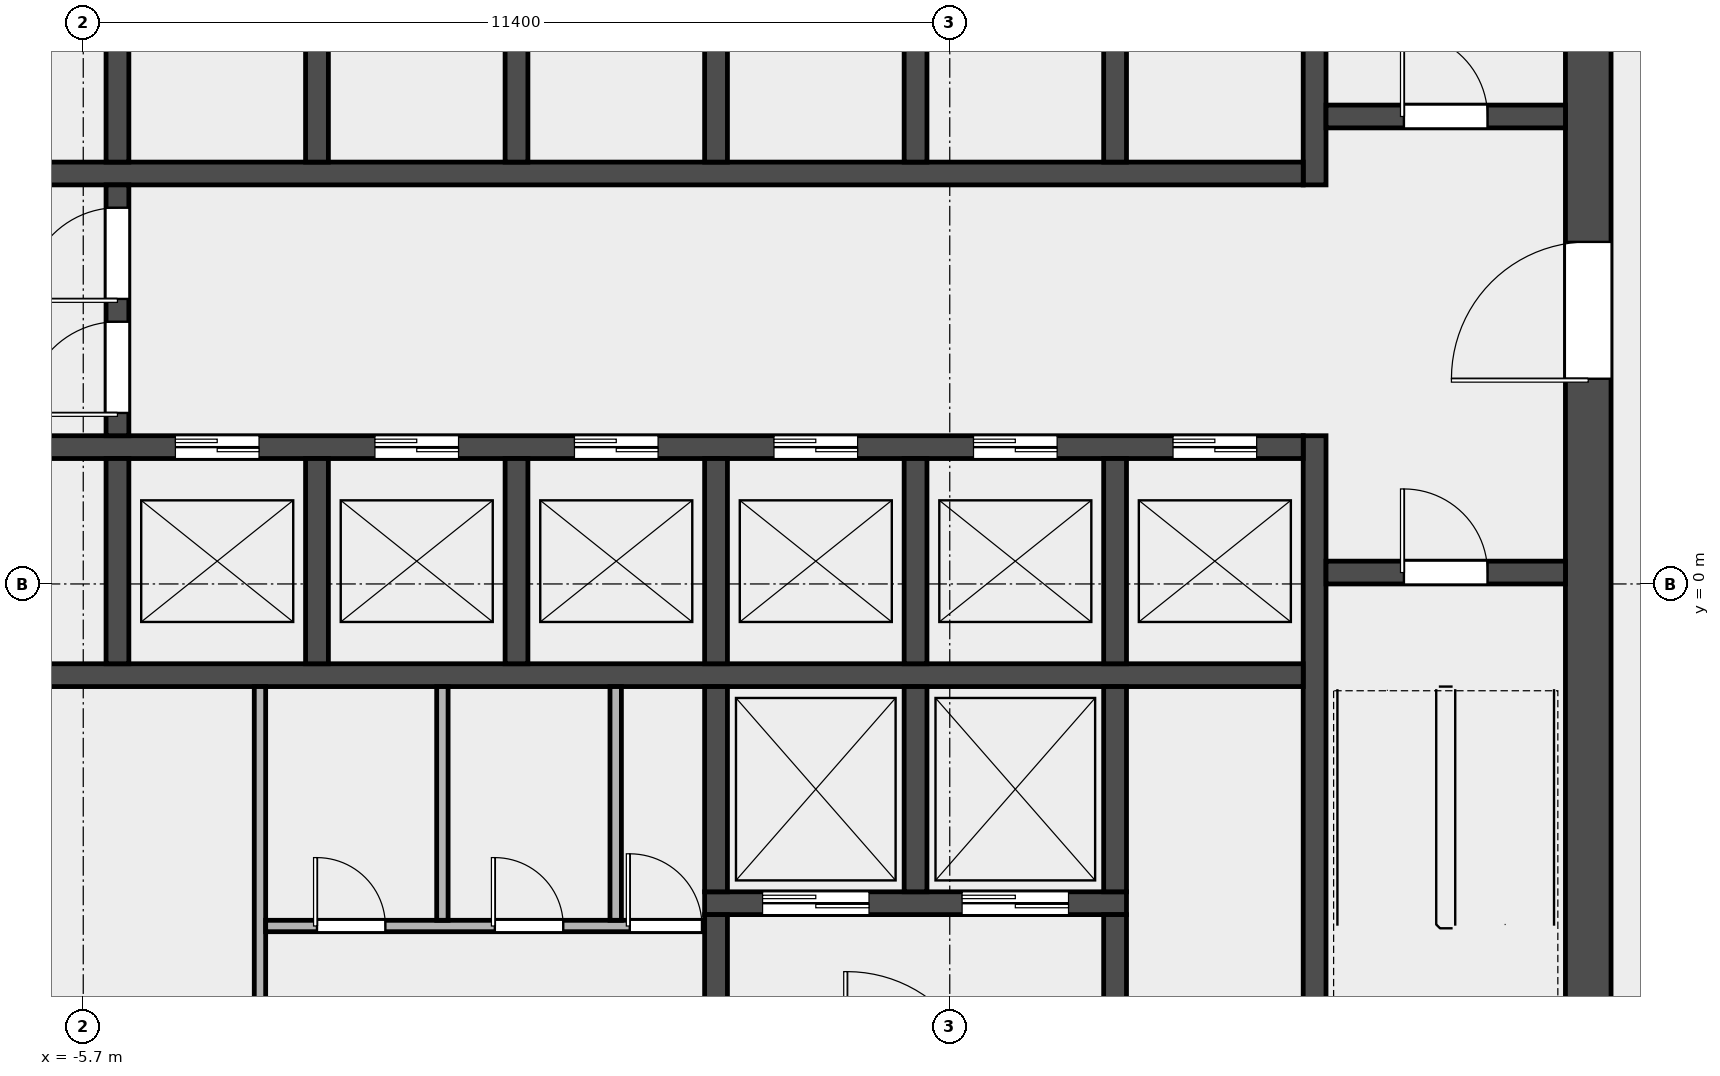
"""IFC4 building model, lengths in metres.
Left out: names, types, materials, properties, quantities, classifications, styles, units other than length and angle.
Written with IfcOpenShell. Run it as: python <this file> out.ifc"""

import sys

from ifc_helpers import new_model, si_unit, direction, frame, frame_2d, origin, place, context, subcontext, project, spatial, rectangle, extrude, element, fill, save


model = new_model("IFC4")
c1 = context("Model", 3, precision=1e-05, world=origin(), true_north=direction((0.0, 1.0)))
c2 = subcontext(c1, "Body", "Model", "MODEL_VIEW")
j1 = project(units=[si_unit("LENGTHUNIT", "METRE"), si_unit("PLANEANGLEUNIT", "RADIAN")], contexts=[c1])
p1 = place(None, origin())
s1 = spatial("IfcSite", under=j1, at=p1, CompositionType="ELEMENT")
p2 = place(p1, origin())
s2 = spatial("IfcBuilding", under=s1, at=p2, CompositionType="ELEMENT")
p3 = place(p2, frame((0.0, 0.0, 169.0)))
s3 = spatial("IfcBuildingStorey", under=s2, at=p3, CompositionType="ELEMENT", Elevation=169.0)
p4 = place(p3, frame((14.1, -6.6, 0.0), z_axis=(0.0, 0.0, 1.0), x_axis=(0.0, 1.0, 0.0)))
e1 = element("IfcWall", 1, at=p4, inside=s3, PredefinedType="SHEAR", context=c2, shape_type="SweptSolid", body=[
    extrude(rectangle(XDim=19.5, YDim=0.6, at=frame_2d((9.75, 0.0))), origin(), (0.0, 0.0, 1.0), 3.7),
])
p5 = place(p4, frame((9.3, 0.0, 0.0)))
e2 = element("IfcOpeningElement", 2, at=p5, cuts=e1, PredefinedType="OPENING", context=c2, shape_type="SweptSolid", body=[
    extrude(rectangle(XDim=1.8, YDim=2.1, at=frame_2d((0.9, 1.05))), frame((0.0, 0.312, 0.0), z_axis=(0.0, -1.0, 0.0), x_axis=(1.0, 0.0, 0.0)), (0.0, 0.0, 1.0), 0.624),
])
p6 = place(p3, frame((10.5, -6.6, 0.0), z_axis=(0.0, 0.0, 1.0), x_axis=(0.0, 1.0, 0.0)))
e3 = element("IfcWall", 3, at=p6, inside=s3, PredefinedType="SHEAR", context=c2, shape_type="SweptSolid", body=[
    extrude(rectangle(XDim=8.55, YDim=0.3, at=frame_2d((4.275, 0.0))), origin(), (0.0, 0.0, 1.0), 3.7),
])
p7 = place(p3, frame((10.5, 5.25, 0.0), z_axis=(0.0, 0.0, 1.0), x_axis=(0.0, 1.0, 0.0)))
e4 = element("IfcWall", 4, at=p7, inside=s3, PredefinedType="SHEAR", context=c2, shape_type="SweptSolid", body=[
    extrude(rectangle(XDim=7.65, YDim=0.3, at=frame_2d((3.825, 0.0))), origin(), (0.0, 0.0, 1.0), 3.7),
])
p8 = place(p3, frame((10.65, 0.15, 0.0), z_axis=(0.0, 0.0, 1.0), x_axis=(1.0, 0.0, 0.0)))
e5 = element("IfcWall", 5, at=p8, inside=s3, PredefinedType="SOLIDWALL", context=c2, shape_type="SweptSolid", body=[
    extrude(rectangle(XDim=3.15, YDim=0.3, at=frame_2d((1.575, 0.0))), origin(), (0.0, 0.0, 1.0), 3.7),
])
p9 = place(p8, frame((1.025, 0.0, 0.0)))
e6 = element("IfcOpeningElement", 6, at=p9, cuts=e5, PredefinedType="OPENING", context=c2, shape_type="SweptSolid", body=[
    extrude(rectangle(XDim=1.1, YDim=2.1, at=frame_2d((0.55, 1.05))), frame((0.0, 0.162, 0.0), z_axis=(0.0, -1.0, 0.0), x_axis=(1.0, 0.0, 0.0)), (0.0, 0.0, 1.0), 0.324),
])
p10 = place(p3, frame((10.65, 6.15, 0.0), z_axis=(0.0, 0.0, 1.0), x_axis=(1.0, 0.0, 0.0)))
e7 = element("IfcWall", 7, at=p10, inside=s3, PredefinedType="SOLIDWALL", context=c2, shape_type="SweptSolid", body=[
    extrude(rectangle(XDim=3.15, YDim=0.3, at=frame_2d((1.575, 0.0))), origin(), (0.0, 0.0, 1.0), 3.7),
])
p11 = place(p10, frame((1.025, 0.0, 0.0)))
e8 = element("IfcOpeningElement", 8, at=p11, cuts=e7, PredefinedType="OPENING", context=c2, shape_type="SweptSolid", body=[
    extrude(rectangle(XDim=1.1, YDim=2.1, at=frame_2d((0.55, 1.05))), frame((0.0, 0.162, 0.0), z_axis=(0.0, -1.0, 0.0), x_axis=(1.0, 0.0, 0.0)), (0.0, 0.0, 1.0), 0.324),
])
p12 = place(p3, frame((-10.35, -1.2, 0.0), z_axis=(0.0, 0.0, 1.0), x_axis=(1.0, 0.0, 0.0)))
e9 = element("IfcWall", 9, at=p12, inside=s3, PredefinedType="SOLIDWALL", context=c2, shape_type="SweptSolid", body=[
    extrude(rectangle(XDim=20.7, YDim=0.3, at=frame_2d((10.35, 0.0))), origin(), (0.0, 0.0, 1.0), 3.7),
])
p13 = place(p3, frame((-10.35, 1.8, 0.0), z_axis=(0.0, 0.0, 1.0), x_axis=(1.0, 0.0, 0.0)))
e10 = element("IfcWall", 10, at=p13, inside=s3, PredefinedType="SOLIDWALL", context=c2, shape_type="SweptSolid", body=[
    extrude(rectangle(XDim=20.7, YDim=0.3, at=frame_2d((10.35, 0.0))), origin(), (0.0, 0.0, 1.0), 3.7),
])
p14 = place(p13, frame((0.512, 0.0, 0.0)))
e11 = element("IfcOpeningElement", 11, at=p14, cuts=e10, PredefinedType="OPENING", context=c2, shape_type="SweptSolid", body=[
    extrude(rectangle(XDim=1.3, YDim=2.1, at=frame_2d((0.65, 1.05))), frame((0.0, 0.162, 0.0), z_axis=(0.0, -1.0, 0.0), x_axis=(1.0, 0.0, 0.0)), (0.0, 0.0, 1.0), 0.324),
])
p15 = place(p13, frame((5.863, 0.0, 0.0)))
e12 = element("IfcOpeningElement", 12, at=p15, cuts=e10, PredefinedType="OPENING", context=c2, shape_type="SweptSolid", body=[
    extrude(rectangle(XDim=1.1, YDim=2.1, at=frame_2d((0.55, 1.05))), frame((0.0, 0.162, 0.0), z_axis=(0.0, -1.0, 0.0), x_axis=(1.0, 0.0, 0.0)), (0.0, 0.0, 1.0), 0.324),
])
p16 = place(p13, frame((8.488, 0.0, 0.0)))
e13 = element("IfcOpeningElement", 13, at=p16, cuts=e10, PredefinedType="OPENING", context=c2, shape_type="SweptSolid", body=[
    extrude(rectangle(XDim=1.1, YDim=2.1, at=frame_2d((0.55, 1.05))), frame((0.0, 0.162, 0.0), z_axis=(0.0, -1.0, 0.0), x_axis=(1.0, 0.0, 0.0)), (0.0, 0.0, 1.0), 0.324),
])
p17 = place(p13, frame((11.113, 0.0, 0.0)))
e14 = element("IfcOpeningElement", 14, at=p17, cuts=e10, PredefinedType="OPENING", context=c2, shape_type="SweptSolid", body=[
    extrude(rectangle(XDim=1.1, YDim=2.1, at=frame_2d((0.55, 1.05))), frame((0.0, 0.162, 0.0), z_axis=(0.0, -1.0, 0.0), x_axis=(1.0, 0.0, 0.0)), (0.0, 0.0, 1.0), 0.324),
])
p18 = place(p13, frame((13.738, 0.0, 0.0)))
e15 = element("IfcOpeningElement", 15, at=p18, cuts=e10, PredefinedType="OPENING", context=c2, shape_type="SweptSolid", body=[
    extrude(rectangle(XDim=1.1, YDim=2.1, at=frame_2d((0.55, 1.05))), frame((0.0, 0.162, 0.0), z_axis=(0.0, -1.0, 0.0), x_axis=(1.0, 0.0, 0.0)), (0.0, 0.0, 1.0), 0.324),
])
p19 = place(p13, frame((16.363, 0.0, 0.0)))
e16 = element("IfcOpeningElement", 16, at=p19, cuts=e10, PredefinedType="OPENING", context=c2, shape_type="SweptSolid", body=[
    extrude(rectangle(XDim=1.1, YDim=2.1, at=frame_2d((0.55, 1.05))), frame((0.0, 0.162, 0.0), z_axis=(0.0, -1.0, 0.0), x_axis=(1.0, 0.0, 0.0)), (0.0, 0.0, 1.0), 0.324),
])
p20 = place(p13, frame((18.988, 0.0, 0.0)))
e17 = element("IfcOpeningElement", 17, at=p20, cuts=e10, PredefinedType="OPENING", context=c2, shape_type="SweptSolid", body=[
    extrude(rectangle(XDim=1.1, YDim=2.1, at=frame_2d((0.55, 1.05))), frame((0.0, 0.162, 0.0), z_axis=(0.0, -1.0, 0.0), x_axis=(1.0, 0.0, 0.0)), (0.0, 0.0, 1.0), 0.324),
])
p21 = place(p3, frame((-10.35, 5.4, 0.0), z_axis=(0.0, 0.0, 1.0), x_axis=(1.0, 0.0, 0.0)))
e18 = element("IfcWall", 18, at=p21, inside=s3, PredefinedType="SOLIDWALL", context=c2, shape_type="SweptSolid", body=[
    extrude(rectangle(XDim=20.7, YDim=0.3, at=frame_2d((10.35, 0.0))), origin(), (0.0, 0.0, 1.0), 3.7),
])
p22 = place(p21, frame((0.512, 0.0, 0.0)))
e19 = element("IfcOpeningElement", 19, at=p22, cuts=e18, PredefinedType="OPENING", context=c2, shape_type="SweptSolid", body=[
    extrude(rectangle(XDim=1.3, YDim=2.1, at=frame_2d((0.65, 1.05))), frame((0.0, 0.162, 0.0), z_axis=(0.0, -1.0, 0.0), x_axis=(1.0, 0.0, 0.0)), (0.0, 0.0, 1.0), 0.324),
])
for number, where, z_axis, x_axis in (
    (20, (-5.25, -1.05, 0.0), (0.0, 0.0, 1.0), (0.0, 1.0, 0.0)),
    (21, (-2.625, -1.05, 0.0), (0.0, 0.0, 1.0), (0.0, 1.0, 0.0)),
    (22, (0.0, -1.05, 0.0), (0.0, 0.0, 1.0), (0.0, 1.0, 0.0)),
    (23, (2.625, -1.05, 0.0), (0.0, 0.0, 1.0), (0.0, 1.0, 0.0)),
    (24, (5.25, -1.05, 0.0), (0.0, 0.0, 1.0), (0.0, 1.0, 0.0)),
    (25, (7.875, -1.05, 0.0), (0.0, 0.0, 1.0), (0.0, 1.0, 0.0)),
    (26, (-5.25, 5.55, 0.0), (0.0, 0.0, 1.0), (0.0, 1.0, 0.0)),
    (27, (-2.625, 5.55, 0.0), (0.0, 0.0, 1.0), (0.0, 1.0, 0.0)),
    (28, (0.0, 5.55, 0.0), (0.0, 0.0, 1.0), (0.0, 1.0, 0.0)),
    (29, (2.625, 5.55, 0.0), (0.0, 0.0, 1.0), (0.0, 1.0, 0.0)),
    (30, (5.25, 5.55, 0.0), (0.0, 0.0, 1.0), (0.0, 1.0, 0.0)),
    (31, (7.875, 5.55, 0.0), (0.0, 0.0, 1.0), (0.0, 1.0, 0.0)),
):
    element("IfcWall", number, at=place(p3, frame(where, z_axis=z_axis, x_axis=x_axis)), inside=s3, PredefinedType="SOLIDWALL", context=c2, shape_type="SweptSolid", body=[
        extrude(rectangle(XDim=2.7, YDim=0.3, at=frame_2d((1.35, 0.0))), origin(), (0.0, 0.0, 1.0), 3.7),
    ])
p23 = place(p3, frame((-5.25, 1.95, 0.0), z_axis=(0.0, 0.0, 1.0), x_axis=(0.0, 1.0, 0.0)))
e32 = element("IfcWall", 32, at=p23, inside=s3, PredefinedType="SOLIDWALL", context=c2, shape_type="SweptSolid", body=[
    extrude(rectangle(XDim=3.3, YDim=0.3, at=frame_2d((1.65, 0.0))), origin(), (0.0, 0.0, 1.0), 3.7),
])
p24 = place(p23, frame((0.3, 0.0, 0.0)))
e33 = element("IfcOpeningElement", 33, at=p24, cuts=e32, PredefinedType="OPENING", context=c2, shape_type="SweptSolid", body=[
    extrude(rectangle(XDim=1.2, YDim=2.1, at=frame_2d((0.6, 1.05))), frame((0.0, 0.162, 0.0), z_axis=(0.0, -1.0, 0.0), x_axis=(1.0, 0.0, 0.0)), (0.0, 0.0, 1.0), 0.324),
])
p25 = place(p23, frame((1.8, 0.0, 0.0)))
e34 = element("IfcOpeningElement", 34, at=p25, cuts=e32, PredefinedType="OPENING", context=c2, shape_type="SweptSolid", body=[
    extrude(rectangle(XDim=1.2, YDim=2.1, at=frame_2d((0.6, 1.05))), frame((0.0, 0.162, 0.0), z_axis=(0.0, -1.0, 0.0), x_axis=(1.0, 0.0, 0.0)), (0.0, 0.0, 1.0), 0.324),
])
p26 = place(p3, frame((2.475, -4.2, 0.0), z_axis=(0.0, 0.0, 1.0), x_axis=(1.0, 0.0, 0.0)))
e35 = element("IfcWall", 35, at=p26, inside=s3, PredefinedType="SOLIDWALL", context=c2, shape_type="SweptSolid", body=[
    extrude(rectangle(XDim=5.55, YDim=0.3, at=frame_2d((2.775, 0.0))), origin(), (0.0, 0.0, 1.0), 3.7),
])
p27 = place(p26, frame((0.762, 0.0, 0.0)))
e36 = element("IfcOpeningElement", 36, at=p27, cuts=e35, PredefinedType="OPENING", context=c2, shape_type="SweptSolid", body=[
    extrude(rectangle(XDim=1.4, YDim=2.1, at=frame_2d((0.7, 1.05))), frame((0.0, 0.162, 0.0), z_axis=(0.0, -1.0, 0.0), x_axis=(1.0, 0.0, 0.0)), (0.0, 0.0, 1.0), 0.324),
])
p28 = place(p26, frame((3.387, 0.0, 0.0)))
e37 = element("IfcOpeningElement", 37, at=p28, cuts=e35, PredefinedType="OPENING", context=c2, shape_type="SweptSolid", body=[
    extrude(rectangle(XDim=1.4, YDim=2.1, at=frame_2d((0.7, 1.05))), frame((0.0, 0.162, 0.0), z_axis=(0.0, -1.0, 0.0), x_axis=(1.0, 0.0, 0.0)), (0.0, 0.0, 1.0), 0.324),
])
p29 = place(p3, frame((2.625, -4.05, 0.0), z_axis=(0.0, 0.0, 1.0), x_axis=(0.0, 1.0, 0.0)))
e38 = element("IfcWall", 38, at=p29, inside=s3, PredefinedType="SOLIDWALL", context=c2, shape_type="SweptSolid", body=[
    extrude(rectangle(XDim=2.7, YDim=0.3, at=frame_2d((1.35, 0.0))), origin(), (0.0, 0.0, 1.0), 3.7),
])
p30 = place(p3, frame((2.625, -6.6, 0.0), z_axis=(0.0, 0.0, 1.0), x_axis=(0.0, 1.0, 0.0)))
e39 = element("IfcWall", 39, at=p30, inside=s3, PredefinedType="SOLIDWALL", context=c2, shape_type="SweptSolid", body=[
    extrude(rectangle(XDim=2.25, YDim=0.3, at=frame_2d((1.125, 0.0))), origin(), (0.0, 0.0, 1.0), 3.7),
])
for number, where, z_axis, x_axis in (
    (40, (5.25, -4.05, 0.0), (0.0, 0.0, 1.0), (0.0, 1.0, 0.0)),
    (41, (7.875, -4.05, 0.0), (0.0, 0.0, 1.0), (0.0, 1.0, 0.0)),
):
    element("IfcWall", number, at=place(p3, frame(where, z_axis=z_axis, x_axis=x_axis)), inside=s3, PredefinedType="SOLIDWALL", context=c2, shape_type="SweptSolid", body=[
        extrude(rectangle(XDim=2.7, YDim=0.3, at=frame_2d((1.35, 0.0))), origin(), (0.0, 0.0, 1.0), 3.7),
    ])
p31 = place(p3, frame((7.875, -6.6, 0.0), z_axis=(0.0, 0.0, 1.0), x_axis=(0.0, 1.0, 0.0)))
e42 = element("IfcWall", 42, at=p31, inside=s3, PredefinedType="SOLIDWALL", context=c2, shape_type="SweptSolid", body=[
    extrude(rectangle(XDim=2.25, YDim=0.3, at=frame_2d((1.125, 0.0))), origin(), (0.0, 0.0, 1.0), 3.7),
])
p32 = place(p3, frame((-3.375, -6.6, 0.0), z_axis=(0.0, 0.0, 1.0), x_axis=(0.0, 1.0, 0.0)))
e43 = element("IfcWall", 43, at=p32, inside=s3, PredefinedType="PARTITIONING", context=c2, shape_type="SweptSolid", body=[
    extrude(rectangle(XDim=5.25, YDim=0.15, at=frame_2d((2.625, 0.0))), origin(), (0.0, 0.0, 1.0), 3.7),
])
p33 = place(p3, frame((-3.3, -4.5, 0.0), z_axis=(0.0, 0.0, 1.0), x_axis=(1.0, 0.0, 0.0)))
e44 = element("IfcWall", 44, at=p33, inside=s3, PredefinedType="PARTITIONING", context=c2, shape_type="SweptSolid", body=[
    extrude(rectangle(XDim=5.775, YDim=0.15, at=frame_2d((2.888, 0.0))), origin(), (0.0, 0.0, 1.0), 3.7),
])
p34 = place(p33, frame((0.675, 0.0, 0.0)))
e45 = element("IfcOpeningElement", 45, at=p34, cuts=e44, PredefinedType="OPENING", context=c2, shape_type="SweptSolid", body=[
    extrude(rectangle(XDim=0.9, YDim=2.1, at=frame_2d((0.45, 1.05))), frame((0.0, 0.087, 0.0), z_axis=(0.0, -1.0, 0.0), x_axis=(1.0, 0.0, 0.0)), (0.0, 0.0, 1.0), 0.174),
])
p35 = place(p33, frame((3.015, 0.0, 0.0)))
e46 = element("IfcOpeningElement", 46, at=p35, cuts=e44, PredefinedType="OPENING", context=c2, shape_type="SweptSolid", body=[
    extrude(rectangle(XDim=0.9, YDim=2.1, at=frame_2d((0.45, 1.05))), frame((0.0, 0.087, 0.0), z_axis=(0.0, -1.0, 0.0), x_axis=(1.0, 0.0, 0.0)), (0.0, 0.0, 1.0), 0.174),
])
p36 = place(p33, frame((4.79, 0.0, 0.0)))
e47 = element("IfcOpeningElement", 47, at=p36, cuts=e44, PredefinedType="OPENING", context=c2, shape_type="SweptSolid", body=[
    extrude(rectangle(XDim=0.95, YDim=2.1, at=frame_2d((0.475, 1.05))), frame((0.0, 0.087, 0.0), z_axis=(0.0, -1.0, 0.0), x_axis=(1.0, 0.0, 0.0)), (0.0, 0.0, 1.0), 0.174),
])
for number, where, z_axis, x_axis in (
    (48, (-0.975, -4.425, 0.0), (0.0, 0.0, 1.0), (0.0, 1.0, 0.0)),
    (49, (1.305, -4.425, 0.0), (0.0, 0.0, 1.0), (0.0, 1.0, 0.0)),
):
    element("IfcWall", number, at=place(p3, frame(where, z_axis=z_axis, x_axis=x_axis)), inside=s3, PredefinedType="PARTITIONING", context=c2, shape_type="SweptSolid", body=[
        extrude(rectangle(XDim=3.075, YDim=0.15, at=frame_2d((1.538, 0.0))), origin(), (0.0, 0.0, 1.0), 3.7),
    ])
p37 = place(p9, origin())
e50 = element("IfcDoor", 50, at=p37, inside=s3, OperationType="SINGLE_SWING_RIGHT", PredefinedType="DOOR", context=c2, shape_type="SweptSolid", body=[
    extrude(rectangle(XDim=1.1, YDim=2.1, at=frame_2d((0.55, 1.05))), frame((0.0, 0.025, 0.0), z_axis=(0.0, -1.0, 0.0), x_axis=(1.0, 0.0, 0.0)), (0.0, 0.0, 1.0), 0.05),
])
fill(e6, e50)
p38 = place(p11, origin())
e51 = element("IfcDoor", 51, at=p38, inside=s3, OperationType="SINGLE_SWING_RIGHT", PredefinedType="DOOR", context=c2, shape_type="SweptSolid", body=[
    extrude(rectangle(XDim=1.1, YDim=2.1, at=frame_2d((0.55, 1.05))), frame((0.0, 0.025, 0.0), z_axis=(0.0, -1.0, 0.0), x_axis=(1.0, 0.0, 0.0)), (0.0, 0.0, 1.0), 0.05),
])
fill(e8, e51)
p39 = place(p5, origin())
e52 = element("IfcDoor", 52, at=p39, inside=s3, OperationType="DOUBLE_DOOR_SINGLE_SWING", PredefinedType="DOOR", context=c2, shape_type="SweptSolid", body=[
    extrude(rectangle(XDim=1.8, YDim=2.1, at=frame_2d((0.9, 1.05))), frame((0.0, 0.025, 0.0), z_axis=(0.0, -1.0, 0.0), x_axis=(1.0, 0.0, 0.0)), (0.0, 0.0, 1.0), 0.05),
])
fill(e2, e52)
p40 = place(p24, origin())
e53 = element("IfcDoor", 53, at=p40, inside=s3, OperationType="SINGLE_SWING_LEFT", PredefinedType="DOOR", context=c2, shape_type="SweptSolid", body=[
    extrude(rectangle(XDim=1.2, YDim=2.1, at=frame_2d((0.6, 1.05))), frame((0.0, 0.025, 0.0), z_axis=(0.0, -1.0, 0.0), x_axis=(1.0, 0.0, 0.0)), (0.0, 0.0, 1.0), 0.05),
])
fill(e33, e53)
p41 = place(p25, origin())
e54 = element("IfcDoor", 54, at=p41, inside=s3, OperationType="SINGLE_SWING_RIGHT", PredefinedType="DOOR", context=c2, shape_type="SweptSolid", body=[
    extrude(rectangle(XDim=1.2, YDim=2.1, at=frame_2d((0.6, 1.05))), frame((0.0, 0.025, 0.0), z_axis=(0.0, -1.0, 0.0), x_axis=(1.0, 0.0, 0.0)), (0.0, 0.0, 1.0), 0.05),
])
fill(e34, e54)
p42 = place(p15, origin())
e55 = element("IfcDoor", 55, at=p42, inside=s3, OperationType="DOUBLE_DOOR_SLIDING", PredefinedType="DOOR", context=c2, shape_type="SweptSolid", body=[
    extrude(rectangle(XDim=1.1, YDim=2.1, at=frame_2d((0.55, 1.05))), frame((0.0, 0.025, 0.0), z_axis=(0.0, -1.0, 0.0), x_axis=(1.0, 0.0, 0.0)), (0.0, 0.0, 1.0), 0.05),
])
fill(e12, e55)
p43 = place(p16, origin())
e56 = element("IfcDoor", 56, at=p43, inside=s3, OperationType="DOUBLE_DOOR_SLIDING", PredefinedType="DOOR", context=c2, shape_type="SweptSolid", body=[
    extrude(rectangle(XDim=1.1, YDim=2.1, at=frame_2d((0.55, 1.05))), frame((0.0, 0.025, 0.0), z_axis=(0.0, -1.0, 0.0), x_axis=(1.0, 0.0, 0.0)), (0.0, 0.0, 1.0), 0.05),
])
fill(e13, e56)
p44 = place(p17, origin())
e57 = element("IfcDoor", 57, at=p44, inside=s3, OperationType="DOUBLE_DOOR_SLIDING", PredefinedType="DOOR", context=c2, shape_type="SweptSolid", body=[
    extrude(rectangle(XDim=1.1, YDim=2.1, at=frame_2d((0.55, 1.05))), frame((0.0, 0.025, 0.0), z_axis=(0.0, -1.0, 0.0), x_axis=(1.0, 0.0, 0.0)), (0.0, 0.0, 1.0), 0.05),
])
fill(e14, e57)
p45 = place(p18, origin())
e58 = element("IfcDoor", 58, at=p45, inside=s3, OperationType="DOUBLE_DOOR_SLIDING", PredefinedType="DOOR", context=c2, shape_type="SweptSolid", body=[
    extrude(rectangle(XDim=1.1, YDim=2.1, at=frame_2d((0.55, 1.05))), frame((0.0, 0.025, 0.0), z_axis=(0.0, -1.0, 0.0), x_axis=(1.0, 0.0, 0.0)), (0.0, 0.0, 1.0), 0.05),
])
fill(e15, e58)
p46 = place(p19, origin())
e59 = element("IfcDoor", 59, at=p46, inside=s3, OperationType="DOUBLE_DOOR_SLIDING", PredefinedType="DOOR", context=c2, shape_type="SweptSolid", body=[
    extrude(rectangle(XDim=1.1, YDim=2.1, at=frame_2d((0.55, 1.05))), frame((0.0, 0.025, 0.0), z_axis=(0.0, -1.0, 0.0), x_axis=(1.0, 0.0, 0.0)), (0.0, 0.0, 1.0), 0.05),
])
fill(e16, e59)
p47 = place(p20, origin())
e60 = element("IfcDoor", 60, at=p47, inside=s3, OperationType="DOUBLE_DOOR_SLIDING", PredefinedType="DOOR", context=c2, shape_type="SweptSolid", body=[
    extrude(rectangle(XDim=1.1, YDim=2.1, at=frame_2d((0.55, 1.05))), frame((0.0, 0.025, 0.0), z_axis=(0.0, -1.0, 0.0), x_axis=(1.0, 0.0, 0.0)), (0.0, 0.0, 1.0), 0.05),
])
fill(e17, e60)
p48 = place(p27, origin())
e61 = element("IfcDoor", 61, at=p48, inside=s3, OperationType="DOUBLE_DOOR_SLIDING", PredefinedType="DOOR", context=c2, shape_type="SweptSolid", body=[
    extrude(rectangle(XDim=1.4, YDim=2.1, at=frame_2d((0.7, 1.05))), frame((0.0, 0.025, 0.0), z_axis=(0.0, -1.0, 0.0), x_axis=(1.0, 0.0, 0.0)), (0.0, 0.0, 1.0), 0.05),
])
fill(e36, e61)
p49 = place(p28, origin())
e62 = element("IfcDoor", 62, at=p49, inside=s3, OperationType="DOUBLE_DOOR_SLIDING", PredefinedType="DOOR", context=c2, shape_type="SweptSolid", body=[
    extrude(rectangle(XDim=1.4, YDim=2.1, at=frame_2d((0.7, 1.05))), frame((0.0, 0.025, 0.0), z_axis=(0.0, -1.0, 0.0), x_axis=(1.0, 0.0, 0.0)), (0.0, 0.0, 1.0), 0.05),
])
fill(e37, e62)
p50 = place(p34, origin())
e63 = element("IfcDoor", 63, at=p50, inside=s3, OperationType="SINGLE_SWING_LEFT", PredefinedType="DOOR", context=c2, shape_type="SweptSolid", body=[
    extrude(rectangle(XDim=0.9, YDim=2.1, at=frame_2d((0.45, 1.05))), frame((0.0, 0.025, 0.0), z_axis=(0.0, -1.0, 0.0), x_axis=(1.0, 0.0, 0.0)), (0.0, 0.0, 1.0), 0.05),
])
fill(e45, e63)
p51 = place(p35, origin())
e64 = element("IfcDoor", 64, at=p51, inside=s3, OperationType="SINGLE_SWING_LEFT", PredefinedType="DOOR", context=c2, shape_type="SweptSolid", body=[
    extrude(rectangle(XDim=0.9, YDim=2.1, at=frame_2d((0.45, 1.05))), frame((0.0, 0.025, 0.0), z_axis=(0.0, -1.0, 0.0), x_axis=(1.0, 0.0, 0.0)), (0.0, 0.0, 1.0), 0.05),
])
fill(e46, e64)
p52 = place(p36, origin())
e65 = element("IfcDoor", 65, at=p52, inside=s3, OperationType="SINGLE_SWING_LEFT", PredefinedType="DOOR", context=c2, shape_type="SweptSolid", body=[
    extrude(rectangle(XDim=0.95, YDim=2.1, at=frame_2d((0.475, 1.05))), frame((0.0, 0.025, 0.0), z_axis=(0.0, -1.0, 0.0), x_axis=(1.0, 0.0, 0.0)), (0.0, 0.0, 1.0), 0.05),
])
fill(e47, e65)
save(model, sys.argv[1])
